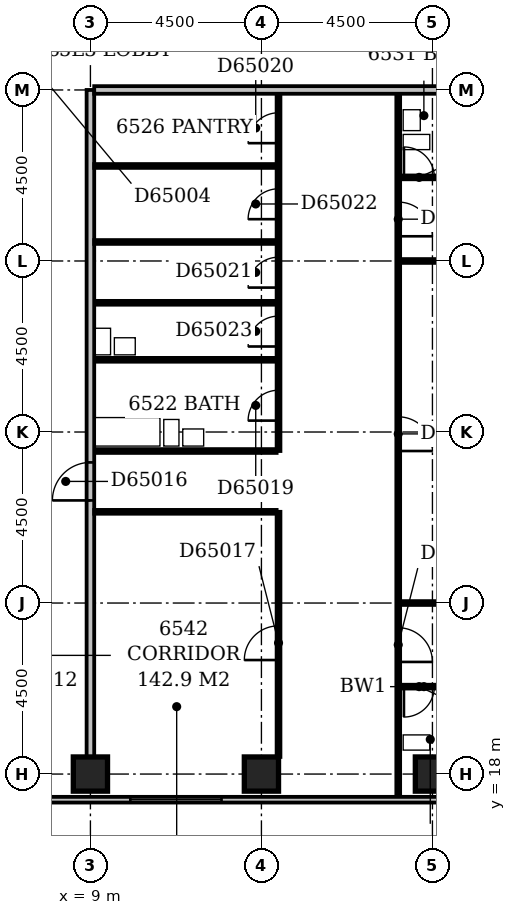
"""IFC4 building model, lengths in metres.
Left out: names, types, materials, properties, quantities, classifications, styles, units other than length and angle.
Written with IfcOpenShell. Run it as: python <this file> out.ifc"""

import sys

from ifc_helpers import new_model, si_unit, direction, frame, frame_2d, origin, origin_2d, place, context, subcontext, project, spatial, rectangle, extrude, element, fill, save


model = new_model("IFC4")
c1 = context("Model", 3, precision=1e-05, world=origin(), true_north=direction((0.0, 1.0)))
c2 = subcontext(c1, "Body", "Model", "MODEL_VIEW")
j1 = project(units=[si_unit("LENGTHUNIT", "METRE"), si_unit("PLANEANGLEUNIT", "RADIAN")], contexts=[c1])
p1 = place(None, origin())
s1 = spatial("IfcSite", under=j1, at=p1, CompositionType="ELEMENT")
p2 = place(p1, origin())
s2 = spatial("IfcBuilding", under=s1, at=p2, CompositionType="ELEMENT")
p3 = place(p2, frame((0.0, 0.0, 251.0)))
s3 = spatial("IfcBuildingStorey", under=s2, at=p3, CompositionType="ELEMENT", Elevation=251.0)
for number, where, z_axis, x_axis in (
    (1, (9.0, 18.0, -0.3), (0.0, 0.0, 1.0), (1.0, 0.0, 0.0)),
    (2, (13.5, 18.0, -0.3), (0.0, 0.0, 1.0), (1.0, 0.0, 0.0)),
    (3, (18.0, 18.0, -0.3), (0.0, 0.0, 1.0), (1.0, 0.0, 0.0)),
):
    element("IfcColumn", number, at=place(p3, frame(where, z_axis=z_axis, x_axis=x_axis)), inside=s3, PredefinedType="COLUMN", context=c2, shape_type="SweptSolid", body=[
        extrude(rectangle(XDim=0.9, YDim=0.9, at=origin_2d()), origin(), (0.0, 0.0, 1.0), 3.6),
    ])
p4 = place(p3, frame((3.9, 17.325, 0.0), z_axis=(0.0, 0.0, 1.0), x_axis=(1.0, 0.0, 0.0)))
e4 = element("IfcWall", 4, at=p4, inside=s3, PredefinedType="STANDARD", context=c2, shape_type="SweptSolid", body=[
    extrude(rectangle(XDim=19.35, YDim=0.15, at=frame_2d((9.675, 0.0))), origin(), (0.0, 0.0, 1.0), 2.7),
])
p5 = place(p4, frame((6.15, 0.0, 0.6)))
e5 = element("IfcOpeningElement", 5, at=p5, cuts=e4, PredefinedType="OPENING", context=c2, shape_type="SweptSolid", body=[
    extrude(rectangle(XDim=2.4, YDim=1.8, at=frame_2d((1.2, 0.9))), frame((0.0, 0.087, 0.0), z_axis=(0.0, -1.0, 0.0), x_axis=(1.0, 0.0, 0.0)), (0.0, 0.0, 1.0), 0.174),
])
p6 = place(p4, frame((15.15, 0.0, 0.6)))
e6 = element("IfcOpeningElement", 6, at=p6, cuts=e4, PredefinedType="OPENING", context=c2, shape_type="SweptSolid", body=[
    extrude(rectangle(XDim=2.4, YDim=1.8, at=frame_2d((1.2, 0.9))), frame((0.0, 0.087, 0.0), z_axis=(0.0, -1.0, 0.0), x_axis=(1.0, 0.0, 0.0)), (0.0, 0.0, 1.0), 0.174),
])
p7 = place(p3, frame((17.1, 17.4, 0.0), z_axis=(0.0, 0.0, 1.0), x_axis=(0.0, 1.0, 0.0)))
e7 = element("IfcWall", 7, at=p7, inside=s3, PredefinedType="PARTITIONING", context=c2, shape_type="SweptSolid", body=[
    extrude(rectangle(XDim=18.5, YDim=0.1, at=frame_2d((9.25, 0.0))), origin(), (0.0, 0.0, 1.0), 3.3),
])
p8 = place(p7, frame((3.55, 0.0, 0.0)))
e8 = element("IfcOpeningElement", 8, at=p8, cuts=e7, PredefinedType="OPENING", context=c2, shape_type="SweptSolid", body=[
    extrude(rectangle(XDim=0.9, YDim=2.1, at=frame_2d((0.45, 1.05))), frame((0.0, 0.062, 0.0), z_axis=(0.0, -1.0, 0.0), x_axis=(1.0, 0.0, 0.0)), (0.0, 0.0, 1.0), 0.124),
])
p9 = place(p7, frame((9.1, 0.0, 0.0)))
e9 = element("IfcOpeningElement", 9, at=p9, cuts=e7, PredefinedType="OPENING", context=c2, shape_type="SweptSolid", body=[
    extrude(rectangle(XDim=0.9, YDim=2.1, at=frame_2d((0.45, 1.05))), frame((0.0, 0.062, 0.0), z_axis=(0.0, -1.0, 0.0), x_axis=(1.0, 0.0, 0.0)), (0.0, 0.0, 1.0), 0.124),
])
p10 = place(p7, frame((14.75, 0.0, 0.0)))
e10 = element("IfcOpeningElement", 10, at=p10, cuts=e7, PredefinedType="OPENING", context=c2, shape_type="SweptSolid", body=[
    extrude(rectangle(XDim=0.9, YDim=2.1, at=frame_2d((0.45, 1.05))), frame((0.0, 0.062, 0.0), z_axis=(0.0, -1.0, 0.0), x_axis=(1.0, 0.0, 0.0)), (0.0, 0.0, 1.0), 0.124),
])
p11 = place(p3, frame((9.0, 18.45, 0.0), z_axis=(0.0, 0.0, 1.0), x_axis=(0.0, 1.0, 0.0)))
e11 = element("IfcWall", 11, at=p11, inside=s3, PredefinedType="PARTITIONING", context=c2, shape_type="SweptSolid", body=[
    extrude(rectangle(XDim=17.55, YDim=0.2, at=frame_2d((8.775, 0.0))), origin(), (0.0, 0.0, 1.0), 3.3),
])
p12 = place(p11, frame((6.75, 0.0, 0.0)))
e12 = element("IfcOpeningElement", 12, at=p12, cuts=e11, PredefinedType="OPENING", context=c2, shape_type="SweptSolid", body=[
    extrude(rectangle(XDim=1.0, YDim=2.1, at=frame_2d((0.5, 1.05))), frame((0.0, 0.112, 0.0), z_axis=(0.0, -1.0, 0.0), x_axis=(1.0, 0.0, 0.0)), (0.0, 0.0, 1.0), 0.224),
])
p13 = place(p3, frame((13.95, 18.45, 0.0), z_axis=(0.0, 0.0, 1.0), x_axis=(0.0, 1.0, 0.0)))
e13 = element("IfcWall", 13, at=p13, inside=s3, PredefinedType="PARTITIONING", context=c2, shape_type="SweptSolid", body=[
    extrude(rectangle(XDim=6.45, YDim=0.1, at=frame_2d((3.225, 0.0))), origin(), (0.0, 0.0, 1.0), 3.3),
])
p14 = place(p13, frame((2.55, 0.0, 0.0)))
e14 = element("IfcOpeningElement", 14, at=p14, cuts=e13, PredefinedType="OPENING", context=c2, shape_type="SweptSolid", body=[
    extrude(rectangle(XDim=0.9, YDim=2.1, at=frame_2d((0.45, 1.05))), frame((0.0, 0.062, 0.0), z_axis=(0.0, -1.0, 0.0), x_axis=(1.0, 0.0, 0.0)), (0.0, 0.0, 1.0), 0.124),
])
p15 = place(p3, frame((17.15, 20.3, 0.0), z_axis=(0.0, 0.0, 1.0), x_axis=(1.0, 0.0, 0.0)))
e15 = element("IfcWall", 15, at=p15, inside=s3, PredefinedType="PLUMBINGWALL", context=c2, shape_type="SweptSolid", body=[
    extrude(rectangle(XDim=1.25, YDim=0.1, at=frame_2d((0.625, 0.0))), origin(), (0.0, 0.0, 1.0), 3.3),
])
p16 = place(p15, frame((0.1, 0.0, 0.0)))
e16 = element("IfcOpeningElement", 16, at=p16, cuts=e15, PredefinedType="OPENING", context=c2, shape_type="SweptSolid", body=[
    extrude(rectangle(XDim=0.8, YDim=2.1, at=frame_2d((0.4, 1.05))), frame((0.0, 0.062, 0.0), z_axis=(0.0, -1.0, 0.0), x_axis=(1.0, 0.0, 0.0)), (0.0, 0.0, 1.0), 0.124),
])
p17 = place(p3, frame((17.15, 22.5, 0.0), z_axis=(0.0, 0.0, 1.0), x_axis=(1.0, 0.0, 0.0)))
e17 = element("IfcWall", 17, at=p17, inside=s3, PredefinedType="PARTITIONING", context=c2, shape_type="SweptSolid", body=[
    extrude(rectangle(XDim=4.9, YDim=0.1, at=frame_2d((2.45, 0.0))), origin(), (0.0, 0.0, 1.0), 3.3),
])
p18 = place(p3, frame((9.1, 24.9, 0.0), z_axis=(0.0, 0.0, 1.0), x_axis=(1.0, 0.0, 0.0)))
e18 = element("IfcWall", 18, at=p18, inside=s3, PredefinedType="PARTITIONING", context=c2, shape_type="SweptSolid", body=[
    extrude(rectangle(XDim=4.8, YDim=0.1, at=frame_2d((2.4, 0.0))), origin(), (0.0, 0.0, 1.0), 3.3),
])
p19 = place(p3, frame((9.1, 26.5, 0.0), z_axis=(0.0, 0.0, 1.0), x_axis=(1.0, 0.0, 0.0)))
e19 = element("IfcWall", 19, at=p19, inside=s3, PredefinedType="PLUMBINGWALL", context=c2, shape_type="SweptSolid", body=[
    extrude(rectangle(XDim=4.8, YDim=0.1, at=frame_2d((2.4, 0.0))), origin(), (0.0, 0.0, 1.0), 2.7),
])
p20 = place(p3, frame((13.95, 26.5, 0.0), z_axis=(0.0, 0.0, 1.0), x_axis=(0.0, 1.0, 0.0)))
e20 = element("IfcWall", 20, at=p20, inside=s3, PredefinedType="PARTITIONING", context=c2, shape_type="SweptSolid", body=[
    extrude(rectangle(XDim=9.4, YDim=0.1, at=frame_2d((4.7, 0.0))), origin(), (0.0, 0.0, 1.0), 3.3),
])
p21 = place(p20, frame((0.8, 0.0, 0.0)))
e21 = element("IfcOpeningElement", 21, at=p21, cuts=e20, PredefinedType="OPENING", context=c2, shape_type="SweptSolid", body=[
    extrude(rectangle(XDim=0.8, YDim=2.1, at=frame_2d((0.4, 1.05))), frame((0.0, 0.062, 0.0), z_axis=(0.0, -1.0, 0.0), x_axis=(1.0, 0.0, 0.0)), (0.0, 0.0, 1.0), 0.124),
])
p22 = place(p20, frame((8.1, 0.0, 0.0)))
e22 = element("IfcOpeningElement", 22, at=p22, cuts=e20, PredefinedType="OPENING", context=c2, shape_type="SweptSolid", body=[
    extrude(rectangle(XDim=0.8, YDim=2.1, at=frame_2d((0.4, 1.05))), frame((0.0, 0.062, 0.0), z_axis=(0.0, -1.0, 0.0), x_axis=(1.0, 0.0, 0.0)), (0.0, 0.0, 1.0), 0.124),
])
p23 = place(p20, frame((4.3, 0.0, 0.0)))
e23 = element("IfcOpeningElement", 23, at=p23, cuts=e20, PredefinedType="OPENING", context=c2, shape_type="SweptSolid", body=[
    extrude(rectangle(XDim=0.8, YDim=2.1, at=frame_2d((0.4, 1.05))), frame((0.0, 0.062, 0.0), z_axis=(0.0, -1.0, 0.0), x_axis=(1.0, 0.0, 0.0)), (0.0, 0.0, 1.0), 0.124),
])
p24 = place(p20, frame((6.1, 0.0, 0.0)))
e24 = element("IfcOpeningElement", 24, at=p24, cuts=e20, PredefinedType="OPENING", context=c2, shape_type="SweptSolid", body=[
    extrude(rectangle(XDim=0.8, YDim=2.1, at=frame_2d((0.4, 1.05))), frame((0.0, 0.062, 0.0), z_axis=(0.0, -1.0, 0.0), x_axis=(1.0, 0.0, 0.0)), (0.0, 0.0, 1.0), 0.124),
])
p25 = place(p20, frame((2.75, 0.0, 0.0)))
e25 = element("IfcOpeningElement", 25, at=p25, cuts=e20, PredefinedType="OPENING", context=c2, shape_type="SweptSolid", body=[
    extrude(rectangle(XDim=0.8, YDim=2.1, at=frame_2d((0.4, 1.05))), frame((0.0, 0.062, 0.0), z_axis=(0.0, -1.0, 0.0), x_axis=(1.0, 0.0, 0.0)), (0.0, 0.0, 1.0), 0.124),
])
for number, where, z_axis, x_axis in (
    (26, (9.1, 28.9, 0.0), (0.0, 0.0, 1.0), (1.0, 0.0, 0.0)),
    (27, (9.1, 30.4, 0.0), (0.0, 0.0, 1.0), (1.0, 0.0, 0.0)),
):
    element("IfcWall", number, at=place(p3, frame(where, z_axis=z_axis, x_axis=x_axis)), inside=s3, PredefinedType="PLUMBINGWALL", context=c2, shape_type="SweptSolid", body=[
        extrude(rectangle(XDim=4.8, YDim=0.1, at=frame_2d((2.4, 0.0))), origin(), (0.0, 0.0, 1.0), 3.3),
    ])
p26 = place(p3, frame((17.15, 31.5, 0.0), z_axis=(0.0, 0.0, 1.0), x_axis=(1.0, 0.0, 0.0)))
e28 = element("IfcWall", 28, at=p26, inside=s3, PredefinedType="PARTITIONING", context=c2, shape_type="SweptSolid", body=[
    extrude(rectangle(XDim=4.9, YDim=0.1, at=frame_2d((2.45, 0.0))), origin(), (0.0, 0.0, 1.0), 3.3),
])
p27 = place(p3, frame((9.1, 32.0, 0.0), z_axis=(0.0, 0.0, 1.0), x_axis=(1.0, 0.0, 0.0)))
e29 = element("IfcWall", 29, at=p27, inside=s3, PredefinedType="PARTITIONING", context=c2, shape_type="SweptSolid", body=[
    extrude(rectangle(XDim=4.8, YDim=0.1, at=frame_2d((2.4, 0.0))), origin(), (0.0, 0.0, 1.0), 3.3),
])
p28 = place(p3, frame((17.15, 33.7, 0.0), z_axis=(0.0, 0.0, 1.0), x_axis=(1.0, 0.0, 0.0)))
e30 = element("IfcWall", 30, at=p28, inside=s3, PredefinedType="PLUMBINGWALL", context=c2, shape_type="SweptSolid", body=[
    extrude(rectangle(XDim=1.25, YDim=0.1, at=frame_2d((0.625, 0.0))), origin(), (0.0, 0.0, 1.0), 3.3),
])
p29 = place(p28, frame((0.1, 0.0, 0.0)))
e31 = element("IfcOpeningElement", 31, at=p29, cuts=e30, PredefinedType="OPENING", context=c2, shape_type="SweptSolid", body=[
    extrude(rectangle(XDim=0.8, YDim=2.1, at=frame_2d((0.4, 1.05))), frame((0.0, 0.062, 0.0), z_axis=(0.0, -1.0, 0.0), x_axis=(1.0, 0.0, 0.0)), (0.0, 0.0, 1.0), 0.124),
])
p30 = place(p3, frame((9.1, 34.0, 0.0), z_axis=(0.0, 0.0, 1.0), x_axis=(1.0, 0.0, 0.0)))
e32 = element("IfcWall", 32, at=p30, inside=s3, PredefinedType="PARTITIONING", context=c2, shape_type="SweptSolid", body=[
    extrude(rectangle(XDim=4.8, YDim=0.1, at=frame_2d((2.4, 0.0))), origin(), (0.0, 0.0, 1.0), 3.3),
])
p31 = place(p3, frame((9.1, 36.0, 0.0), z_axis=(0.0, 0.0, 1.0), x_axis=(1.0, 0.0, 0.0)))
e33 = element("IfcWall", 33, at=p31, inside=s3, PredefinedType="PARTITIONING", context=c2, shape_type="SweptSolid", body=[
    extrude(rectangle(XDim=12.95, YDim=0.2, at=frame_2d((6.475, 0.0))), origin(), (0.0, 0.0, 1.0), 3.3),
])
p32 = place(p5, origin())
e34 = element("IfcWindow", 34, at=p32, inside=s3, PartitioningType="SINGLE_PANEL", PredefinedType="WINDOW", context=c2, shape_type="SweptSolid", body=[
    extrude(rectangle(XDim=2.4, YDim=1.8, at=frame_2d((1.2, 0.9))), frame((0.0, 0.03, 0.0), z_axis=(0.0, -1.0, 0.0), x_axis=(1.0, 0.0, 0.0)), (0.0, 0.0, 1.0), 0.06),
])
fill(e5, e34)
p33 = place(p8, frame((0.9, 0.0, 0.0), z_axis=(0.0, 0.0, 1.0), x_axis=(-1.0, 0.0, 0.0)))
e35 = element("IfcDoor", 35, at=p33, inside=s3, OperationType="SINGLE_SWING_RIGHT", PredefinedType="DOOR", context=c2, shape_type="SweptSolid", body=[
    extrude(rectangle(XDim=0.9, YDim=2.1, at=frame_2d((0.45, 1.05))), frame((0.0, 0.025, 0.0), z_axis=(0.0, -1.0, 0.0), x_axis=(1.0, 0.0, 0.0)), (0.0, 0.0, 1.0), 0.05),
])
fill(e8, e35)
p34 = place(p9, frame((0.9, 0.0, 0.0), z_axis=(0.0, 0.0, 1.0), x_axis=(-1.0, 0.0, 0.0)))
e36 = element("IfcDoor", 36, at=p34, inside=s3, OperationType="SINGLE_SWING_RIGHT", PredefinedType="DOOR", context=c2, shape_type="SweptSolid", body=[
    extrude(rectangle(XDim=0.9, YDim=2.1, at=frame_2d((0.45, 1.05))), frame((0.0, 0.025, 0.0), z_axis=(0.0, -1.0, 0.0), x_axis=(1.0, 0.0, 0.0)), (0.0, 0.0, 1.0), 0.05),
])
fill(e9, e36)
p35 = place(p10, frame((0.9, 0.0, 0.0), z_axis=(0.0, 0.0, 1.0), x_axis=(-1.0, 0.0, 0.0)))
e37 = element("IfcDoor", 37, at=p35, inside=s3, OperationType="SINGLE_SWING_RIGHT", PredefinedType="DOOR", context=c2, shape_type="SweptSolid", body=[
    extrude(rectangle(XDim=0.9, YDim=2.1, at=frame_2d((0.45, 1.05))), frame((0.0, 0.025, 0.0), z_axis=(0.0, -1.0, 0.0), x_axis=(1.0, 0.0, 0.0)), (0.0, 0.0, 1.0), 0.05),
])
fill(e10, e37)
p36 = place(p12, origin())
e38 = element("IfcDoor", 38, at=p36, inside=s3, OperationType="SINGLE_SWING_LEFT", PredefinedType="DOOR", context=c2, shape_type="SweptSolid", body=[
    extrude(rectangle(XDim=1.0, YDim=2.1, at=frame_2d((0.5, 1.05))), frame((0.0, 0.025, 0.0), z_axis=(0.0, -1.0, 0.0), x_axis=(1.0, 0.0, 0.0)), (0.0, 0.0, 1.0), 0.05),
])
fill(e12, e38)
p37 = place(p14, origin())
e39 = element("IfcDoor", 39, at=p37, inside=s3, OperationType="SINGLE_SWING_LEFT", PredefinedType="DOOR", context=c2, shape_type="SweptSolid", body=[
    extrude(rectangle(XDim=0.9, YDim=2.1, at=frame_2d((0.45, 1.05))), frame((0.0, 0.025, 0.0), z_axis=(0.0, -1.0, 0.0), x_axis=(1.0, 0.0, 0.0)), (0.0, 0.0, 1.0), 0.05),
])
fill(e14, e39)
p38 = place(p16, frame((0.8, 0.0, 0.0), z_axis=(0.0, 0.0, 1.0), x_axis=(-1.0, 0.0, 0.0)))
e40 = element("IfcDoor", 40, at=p38, inside=s3, OperationType="SINGLE_SWING_RIGHT", PredefinedType="DOOR", context=c2, shape_type="SweptSolid", body=[
    extrude(rectangle(XDim=0.8, YDim=2.1, at=frame_2d((0.4, 1.05))), frame((0.0, 0.025, 0.0), z_axis=(0.0, -1.0, 0.0), x_axis=(1.0, 0.0, 0.0)), (0.0, 0.0, 1.0), 0.05),
])
fill(e16, e40)
p39 = place(p21, origin())
e41 = element("IfcDoor", 41, at=p39, inside=s3, OperationType="SINGLE_SWING_LEFT", PredefinedType="DOOR", context=c2, shape_type="SweptSolid", body=[
    extrude(rectangle(XDim=0.8, YDim=2.1, at=frame_2d((0.4, 1.05))), frame((0.0, 0.025, 0.0), z_axis=(0.0, -1.0, 0.0), x_axis=(1.0, 0.0, 0.0)), (0.0, 0.0, 1.0), 0.05),
])
fill(e21, e41)
p40 = place(p22, origin())
e42 = element("IfcDoor", 42, at=p40, inside=s3, OperationType="SINGLE_SWING_LEFT", PredefinedType="DOOR", context=c2, shape_type="SweptSolid", body=[
    extrude(rectangle(XDim=0.8, YDim=2.1, at=frame_2d((0.4, 1.05))), frame((0.0, 0.025, 0.0), z_axis=(0.0, -1.0, 0.0), x_axis=(1.0, 0.0, 0.0)), (0.0, 0.0, 1.0), 0.05),
])
fill(e22, e42)
p41 = place(p23, origin())
e43 = element("IfcDoor", 43, at=p41, inside=s3, OperationType="SINGLE_SWING_LEFT", PredefinedType="DOOR", context=c2, shape_type="SweptSolid", body=[
    extrude(rectangle(XDim=0.8, YDim=2.1, at=frame_2d((0.4, 1.05))), frame((0.0, 0.025, 0.0), z_axis=(0.0, -1.0, 0.0), x_axis=(1.0, 0.0, 0.0)), (0.0, 0.0, 1.0), 0.05),
])
fill(e23, e43)
p42 = place(p24, origin())
e44 = element("IfcDoor", 44, at=p42, inside=s3, OperationType="SINGLE_SWING_LEFT", PredefinedType="DOOR", context=c2, shape_type="SweptSolid", body=[
    extrude(rectangle(XDim=0.8, YDim=2.1, at=frame_2d((0.4, 1.05))), frame((0.0, 0.025, 0.0), z_axis=(0.0, -1.0, 0.0), x_axis=(1.0, 0.0, 0.0)), (0.0, 0.0, 1.0), 0.05),
])
fill(e24, e44)
p43 = place(p25, origin())
e45 = element("IfcDoor", 45, at=p43, inside=s3, OperationType="SINGLE_SWING_LEFT", PredefinedType="DOOR", context=c2, shape_type="SweptSolid", body=[
    extrude(rectangle(XDim=0.8, YDim=2.1, at=frame_2d((0.4, 1.05))), frame((0.0, 0.025, 0.0), z_axis=(0.0, -1.0, 0.0), x_axis=(1.0, 0.0, 0.0)), (0.0, 0.0, 1.0), 0.05),
])
fill(e25, e45)
p44 = place(p29, origin())
e46 = element("IfcDoor", 46, at=p44, inside=s3, OperationType="SINGLE_SWING_LEFT", PredefinedType="DOOR", context=c2, shape_type="SweptSolid", body=[
    extrude(rectangle(XDim=0.8, YDim=2.1, at=frame_2d((0.4, 1.05))), frame((0.0, 0.025, 0.0), z_axis=(0.0, -1.0, 0.0), x_axis=(1.0, 0.0, 0.0)), (0.0, 0.0, 1.0), 0.05),
])
fill(e31, e46)
save(model, sys.argv[1])
